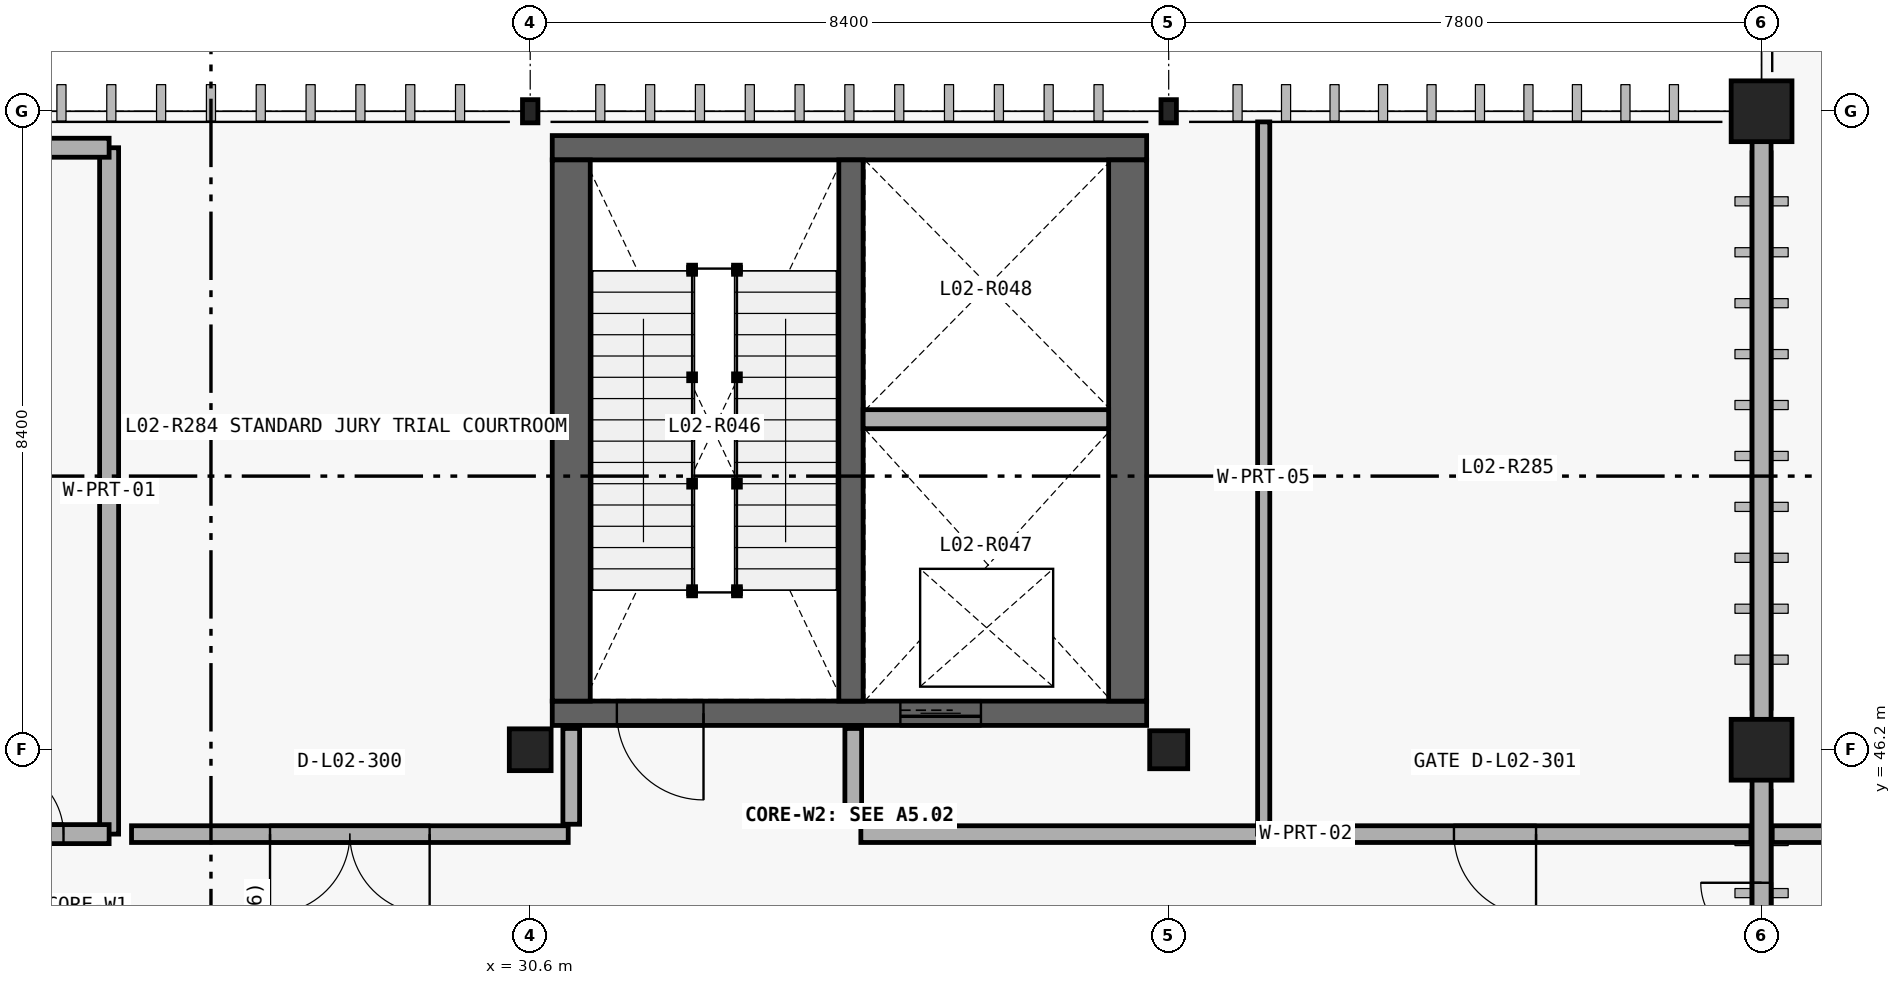
"""IFC4 building model, lengths in metres.
Left out: names, types, materials, properties, quantities, classifications, styles, units other than length and angle.
Written with IfcOpenShell. Run it as: python <this file> out.ifc"""

import sys

from ifc_helpers import new_model, si_unit, direction, frame, frame_2d, origin_with_axes, origin_2d_with_axis, place, context, subcontext, project, spatial, rectangle, hollow_rectangle, circle, i_section, extrude, element, fill, save


model = new_model("IFC4")
c1 = context("Model", 3, precision=1e-05, world=origin_with_axes(), true_north=direction((0.0, 1.0)))
c2 = subcontext(c1, "Body", "Model", "MODEL_VIEW")
j1 = project(units=[si_unit("LENGTHUNIT", "METRE"), si_unit("PLANEANGLEUNIT", "RADIAN")], contexts=[c1])
p1 = place(None, origin_with_axes())
s1 = spatial("IfcSite", under=j1, at=p1, CompositionType="ELEMENT")
p2 = place(p1, origin_with_axes())
s2 = spatial("IfcBuilding", under=s1, at=p2, CompositionType="ELEMENT")
p3 = place(p2, frame((0.0, 0.0, 10.8), z_axis=(0.0, 0.0, 1.0), x_axis=(1.0, 0.0, 0.0)))
s3 = spatial("IfcBuildingStorey", under=s2, at=p3, CompositionType="ELEMENT", Elevation=10.8)
p4 = place(None, frame((25.06, 45.09, 10.8), z_axis=(0.0, 0.0, 1.0), x_axis=(0.0, 1.0, 0.0)))
e1 = element("IfcWall", 1, at=p4, inside=s3, PredefinedType="PARTITIONING", context=c2, shape_type="SweptSolid", body=[
    extrude(rectangle(XDim=9.03, YDim=0.25, at=frame_2d((4.515, 0.0), x_axis=(1.0, 0.0))), origin_with_axes(), (0.0, 0.0, 1.0), 4.44),
])
p5 = place(None, frame((21.7, 54.12, 10.8), z_axis=(0.0, 0.0, 1.0), x_axis=(1.0, 0.0, 0.0)))
e2 = element("IfcWall", 2, at=p5, inside=s3, PredefinedType="PARTITIONING", context=c2, shape_type="SweptSolid", body=[
    extrude(rectangle(XDim=3.36, YDim=0.25, at=frame_2d((1.68, 0.0), x_axis=(1.0, 0.0))), origin_with_axes(), (0.0, 0.0, 1.0), 4.44),
])
p6 = place(None, frame((21.7, 45.09, 10.8), z_axis=(0.0, 0.0, 1.0), x_axis=(1.0, 0.0, 0.0)))
e3 = element("IfcWall", 3, at=p6, inside=s3, PredefinedType="PARTITIONING", context=c2, shape_type="SweptSolid", body=[
    extrude(rectangle(XDim=3.36, YDim=0.25, at=frame_2d((1.68, 0.0), x_axis=(1.0, 0.0))), origin_with_axes(), (0.0, 0.0, 1.0), 4.44),
])
p7 = place(None, frame((24.005, 45.09, 10.8), z_axis=(0.0, 0.0, 1.0), x_axis=(1.0, 0.0, 0.0)))
e4 = element("IfcOpeningElement", 4, at=p7, cuts=e3, PredefinedType="OPENING", context=c2, shape_type="SweptSolid", body=[
    extrude(rectangle(XDim=0.91, YDim=2.12, at=frame_2d((0.0, 1.06), x_axis=(1.0, 0.0))), frame((0.0, 0.135, 0.0), z_axis=(0.0, -1.0, 0.0), x_axis=(1.0, 0.0, 0.0)), (0.0, 0.0, 1.0), 0.27),
])
p8 = place(None, frame((30.89, 46.68, 10.8), z_axis=(0.0, 0.0, 1.0), x_axis=(1.0, 0.0, 0.0)))
e5 = element("IfcWall", 5, at=p8, inside=s3, PredefinedType="SHEAR", context=c2, shape_type="SweptSolid", body=[
    extrude(rectangle(XDim=7.82, YDim=0.32, at=frame_2d((3.91, 0.0), x_axis=(1.0, 0.0))), origin_with_axes(), (0.0, 0.0, 1.0), 4.8),
])
p9 = place(None, frame((32.31, 46.68, 10.8), z_axis=(0.0, 0.0, 1.0), x_axis=(1.0, 0.0, 0.0)))
e6 = element("IfcOpeningElement", 6, at=p9, cuts=e5, PredefinedType="OPENING", context=c2, shape_type="SweptSolid", body=[
    extrude(rectangle(XDim=1.14, YDim=2.18, at=frame_2d((0.0, 1.09), x_axis=(1.0, 0.0))), frame((0.0, 0.17, 0.0), z_axis=(0.0, -1.0, 0.0), x_axis=(1.0, 0.0, 0.0)), (0.0, 0.0, 1.0), 0.34),
])
p10 = place(None, frame((36.0, 46.68, 10.8), z_axis=(0.0, 0.0, 1.0), x_axis=(1.0, 0.0, 0.0)))
e7 = element("IfcOpeningElement", 7, at=p10, cuts=e5, PredefinedType="OPENING", context=c2, shape_type="SweptSolid", body=[
    extrude(rectangle(XDim=1.06, YDim=2.16, at=frame_2d((0.0, 1.08), x_axis=(1.0, 0.0))), frame((0.0, 0.17, 0.0), z_axis=(0.0, -1.0, 0.0), x_axis=(1.0, 0.0, 0.0)), (0.0, 0.0, 1.0), 0.34),
])
p11 = place(None, frame((38.71, 54.12, 10.8), z_axis=(0.0, 0.0, 1.0), x_axis=(-1.0, 0.0, 0.0)))
e8 = element("IfcWall", 8, at=p11, inside=s3, PredefinedType="SHEAR", context=c2, shape_type="SweptSolid", body=[
    extrude(rectangle(XDim=7.82, YDim=0.32, at=frame_2d((3.91, 0.0), x_axis=(1.0, 0.0))), origin_with_axes(), (0.0, 0.0, 1.0), 4.8),
])
for number, where, z_axis, x_axis in (
    (9, (38.46, 46.84, 10.8), (0.0, 0.0, 1.0), (0.0, 1.0, 0.0)),
    (10, (31.14, 53.96, 10.8), (0.0, 0.0, 1.0), (0.0, -1.0, 0.0)),
):
    element("IfcWall", number, at=place(None, frame(where, z_axis=z_axis, x_axis=x_axis)), inside=s3, PredefinedType="SHEAR", context=c2, shape_type="SweptSolid", body=[
        extrude(rectangle(XDim=7.12, YDim=0.5, at=frame_2d((3.56, 0.0), x_axis=(1.0, 0.0))), origin_with_axes(), (0.0, 0.0, 1.0), 4.8),
    ])
p12 = place(None, frame((34.82, 46.84, 10.8), z_axis=(0.0, 0.0, 1.0), x_axis=(0.0, 1.0, 0.0)))
e11 = element("IfcWall", 11, at=p12, inside=s3, PredefinedType="SHEAR", context=c2, shape_type="SweptSolid", body=[
    extrude(rectangle(XDim=7.12, YDim=0.32, at=frame_2d((3.56, 0.0), x_axis=(1.0, 0.0))), origin_with_axes(), (0.0, 0.0, 1.0), 4.8),
])
p13 = place(None, frame((34.98, 50.549, 10.8), z_axis=(0.0, 0.0, 1.0), x_axis=(1.0, 0.0, 0.0)))
e12 = element("IfcWall", 12, at=p13, inside=s3, PredefinedType="PARTITIONING", context=c2, shape_type="SweptSolid", body=[
    extrude(rectangle(XDim=3.23, YDim=0.25, at=frame_2d((1.615, 0.0), x_axis=(1.0, 0.0))), origin_with_axes(), (0.0, 0.0, 1.0), 4.44),
])
p14 = place(None, frame((46.8, 39.05, 10.8), z_axis=(0.0, 0.0, 1.0), x_axis=(0.0, 1.0, 0.0)))
e13 = element("IfcWall", 13, at=p14, inside=s3, PredefinedType="PARTITIONING", context=c2, shape_type="SweptSolid", body=[
    extrude(rectangle(XDim=15.5, YDim=0.25, at=frame_2d((7.75, 0.0), x_axis=(1.0, 0.0))), origin_with_axes(), (0.0, 0.0, 1.0), 4.104),
])
p15 = place(None, frame((46.8, 43.65, 10.8), z_axis=(0.0, 0.0, 1.0), x_axis=(0.0, 1.0, 0.0)))
e14 = element("IfcOpeningElement", 14, at=p15, cuts=e13, PredefinedType="OPENING", context=c2, shape_type="SweptSolid", body=[
    extrude(rectangle(XDim=1.6, YDim=2.32, at=frame_2d((0.0, 1.16), x_axis=(1.0, 0.0))), frame((0.0, 0.135, 0.0), z_axis=(0.0, -1.0, 0.0), x_axis=(1.0, 0.0, 0.0)), (0.0, 0.0, 1.0), 0.27),
])
for number, where, z_axis, x_axis in (
    (15, (31.14, 45.22, 10.8), (0.0, 0.0, 1.0), (0.0, 1.0, 0.0)),
    (16, (34.85, 45.22, 10.8), (0.0, 0.0, 1.0), (0.0, 1.0, 0.0)),
):
    element("IfcWall", number, at=place(None, frame(where, z_axis=z_axis, x_axis=x_axis)), inside=s3, PredefinedType="PARTITIONING", context=c2, shape_type="SweptSolid", body=[
        extrude(rectangle(XDim=1.26, YDim=0.22, at=frame_2d((0.63, 0.0), x_axis=(1.0, 0.0))), origin_with_axes(), (0.0, 0.0, 1.0), 4.44),
    ])
p16 = place(None, frame((25.355, 45.09, 10.8), z_axis=(0.0, 0.0, 1.0), x_axis=(1.0, 0.0, 0.0)))
e17 = element("IfcWall", 17, at=p16, inside=s3, PredefinedType="PARTITIONING", context=c2, shape_type="SweptSolid", body=[
    extrude(rectangle(XDim=5.745, YDim=0.22, at=frame_2d((2.873, 0.0), x_axis=(1.0, 0.0))), origin_with_axes(), (0.0, 0.0, 1.0), 4.44),
])
p17 = place(None, frame((28.227, 45.09, 10.8), z_axis=(0.0, 0.0, 1.0), x_axis=(1.0, 0.0, 0.0)))
e18 = element("IfcOpeningElement", 18, at=p17, cuts=e17, PredefinedType="OPENING", context=c2, shape_type="SweptSolid", body=[
    extrude(rectangle(XDim=2.1, YDim=2.8, at=frame_2d((0.0, 1.4), x_axis=(1.0, 0.0))), frame((0.0, 0.12, 0.0), z_axis=(0.0, -1.0, 0.0), x_axis=(1.0, 0.0, 0.0)), (0.0, 0.0, 1.0), 0.24),
])
p18 = place(None, frame((34.95, 45.09, 10.8), z_axis=(0.0, 0.0, 1.0), x_axis=(1.0, 0.0, 0.0)))
e19 = element("IfcWall", 19, at=p18, inside=s3, PredefinedType="PARTITIONING", context=c2, shape_type="SweptSolid", body=[
    extrude(rectangle(XDim=11.71, YDim=0.22, at=frame_2d((5.855, 0.0), x_axis=(1.0, 0.0))), origin_with_axes(), (0.0, 0.0, 1.0), 4.44),
])
p19 = place(None, frame((43.293, 45.09, 10.8), z_axis=(0.0, 0.0, 1.0), x_axis=(1.0, 0.0, 0.0)))
e20 = element("IfcOpeningElement", 20, at=p19, cuts=e19, PredefinedType="OPENING", context=c2, shape_type="SweptSolid", body=[
    extrude(rectangle(XDim=1.08, YDim=2.18, at=frame_2d((0.0, 1.09), x_axis=(1.0, 0.0))), frame((0.0, 0.12, 0.0), z_axis=(0.0, -1.0, 0.0), x_axis=(1.0, 0.0, 0.0)), (0.0, 0.0, 1.0), 0.24),
])
p20 = place(None, frame((40.25, 45.09, 10.8), z_axis=(0.0, 0.0, 1.0), x_axis=(0.0, 1.0, 0.0)))
e21 = element("IfcWall", 21, at=p20, inside=s3, PredefinedType="PARTITIONING", context=c2, shape_type="SweptSolid", body=[
    extrude(rectangle(XDim=9.37, YDim=0.16, at=frame_2d((4.685, 0.0), x_axis=(1.0, 0.0))), origin_with_axes(), (0.0, 0.0, 1.0), 4.44),
])
p21 = place(None, frame((46.94, 45.09, 10.8), z_axis=(0.0, 0.0, 1.0), x_axis=(1.0, 0.0, 0.0)))
e22 = element("IfcWall", 22, at=p21, inside=s3, PredefinedType="PARTITIONING", context=c2, shape_type="SweptSolid", body=[
    extrude(rectangle(XDim=8.76, YDim=0.22, at=frame_2d((4.38, 0.0), x_axis=(1.0, 0.0))), origin_with_axes(), (0.0, 0.0, 1.0), 4.44),
])
p22 = place(None, frame((51.32, 45.09, 10.8), z_axis=(0.0, 0.0, 1.0), x_axis=(1.0, 0.0, 0.0)))
e23 = element("IfcOpeningElement", 23, at=p22, cuts=e22, PredefinedType="OPENING", context=c2, shape_type="SweptSolid", body=[
    extrude(rectangle(XDim=0.94, YDim=2.3, at=frame_2d((0.0, 1.15), x_axis=(1.0, 0.0))), frame((0.0, 0.12, 0.0), z_axis=(0.0, -1.0, 0.0), x_axis=(1.0, 0.0, 0.0)), (0.0, 0.0, 1.0), 0.24),
])
p23 = place(None, frame((30.6, 46.2, 10.8), z_axis=(0.0, 0.0, 1.0), x_axis=(1.0, 0.0, 0.0)))
e24 = element("IfcColumn", 24, at=p23, inside=s3, PredefinedType="COLUMN", context=c2, shape_type="SweptSolid", body=[
    extrude(i_section(OverallWidth=0.55, OverallDepth=0.55, WebThickness=0.025, FlangeThickness=0.042, at=origin_2d_with_axis()), origin_with_axes(), (0.0, 0.0, 1.0), 4.8),
])
p24 = place(None, frame((30.6, 54.6, 10.8), z_axis=(0.0, 0.0, 1.0), x_axis=(1.0, 0.0, 0.0)))
e25 = element("IfcColumn", 25, at=p24, inside=s3, PredefinedType="COLUMN", context=c2, shape_type="SweptSolid", body=[
    extrude(hollow_rectangle(XDim=0.203, YDim=0.305, WallThickness=0.013, InnerFilletRadius=0.025, OuterFilletRadius=0.013, at=origin_2d_with_axis()), origin_with_axes(), (0.0, 0.0, 1.0), 4.8),
])
p25 = place(None, frame((39.0, 46.2, 10.8), z_axis=(0.0, 0.0, 1.0), x_axis=(1.0, 0.0, 0.0)))
e26 = element("IfcColumn", 26, at=p25, inside=s3, PredefinedType="COLUMN", context=c2, shape_type="SweptSolid", body=[
    extrude(i_section(OverallWidth=0.5, OverallDepth=0.5, WebThickness=0.022, FlangeThickness=0.036, at=origin_2d_with_axis()), origin_with_axes(), (0.0, 0.0, 1.0), 4.8),
])
p26 = place(None, frame((39.0, 54.6, 10.8), z_axis=(0.0, 0.0, 1.0), x_axis=(1.0, 0.0, 0.0)))
e27 = element("IfcColumn", 27, at=p26, inside=s3, PredefinedType="COLUMN", context=c2, shape_type="SweptSolid", body=[
    extrude(hollow_rectangle(XDim=0.203, YDim=0.305, WallThickness=0.013, InnerFilletRadius=0.025, OuterFilletRadius=0.013, at=origin_2d_with_axis()), origin_with_axes(), (0.0, 0.0, 1.0), 4.8),
])
for number, where, z_axis, x_axis in (
    (28, (46.8, 46.2, 10.8), (0.0, 0.0, 1.0), (1.0, 0.0, 0.0)),
    (29, (46.8, 54.6, 10.8), (0.0, 0.0, 1.0), (1.0, 0.0, 0.0)),
):
    element("IfcColumn", number, at=place(None, frame(where, z_axis=z_axis, x_axis=x_axis)), inside=s3, PredefinedType="COLUMN", context=c2, shape_type="SweptSolid", body=[
        extrude(circle(Radius=0.4, at=origin_2d_with_axis()), origin_with_axes(), (0.0, 0.0, 1.0), 4.8),
    ])
p27 = place(None, frame((24.005, 45.09, 10.8), z_axis=(0.0, 0.0, 1.0), x_axis=(1.0, 0.0, 0.0)))
e30 = element("IfcDoor", 30, at=p27, inside=s3, OperationType="SINGLE_SWING_LEFT", PredefinedType="DOOR", context=c2, shape_type="SweptSolid", body=[
    extrude(rectangle(XDim=0.91, YDim=2.12, at=frame_2d((0.0, 1.06), x_axis=(1.0, 0.0))), frame((0.0, 0.04, 0.0), z_axis=(0.0, -1.0, 0.0), x_axis=(1.0, 0.0, 0.0)), (0.0, 0.0, 1.0), 0.08),
])
fill(e4, e30)
p28 = place(None, frame((32.31, 46.68, 10.8), z_axis=(0.0, 0.0, 1.0), x_axis=(-1.0, 0.0, 0.0)))
e31 = element("IfcDoor", 31, at=p28, inside=s3, OperationType="SINGLE_SWING_RIGHT", PredefinedType="DOOR", context=c2, shape_type="SweptSolid", body=[
    extrude(rectangle(XDim=1.14, YDim=2.18, at=frame_2d((0.0, 1.09), x_axis=(1.0, 0.0))), frame((0.0, 0.04, 0.0), z_axis=(0.0, -1.0, 0.0), x_axis=(1.0, 0.0, 0.0)), (0.0, 0.0, 1.0), 0.08),
])
fill(e6, e31)
p29 = place(None, frame((36.0, 46.68, 10.8), z_axis=(0.0, 0.0, 1.0), x_axis=(-1.0, 0.0, 0.0)))
e32 = element("IfcDoor", 32, at=p29, inside=s3, OperationType="SLIDING_TO_LEFT", PredefinedType="DOOR", context=c2, shape_type="SweptSolid", body=[
    extrude(rectangle(XDim=1.06, YDim=2.16, at=frame_2d((0.0, 1.08), x_axis=(1.0, 0.0))), frame((0.0, 0.04, 0.0), z_axis=(0.0, -1.0, 0.0), x_axis=(1.0, 0.0, 0.0)), (0.0, 0.0, 1.0), 0.08),
])
fill(e7, e32)
p30 = place(None, frame((46.8, 43.65, 10.8), z_axis=(0.0, 0.0, 1.0), x_axis=(0.0, 1.0, 0.0)))
e33 = element("IfcDoor", 33, at=p30, inside=s3, OperationType="DOUBLE_DOOR_SINGLE_SWING", PredefinedType="DOOR", context=c2, shape_type="SweptSolid", body=[
    extrude(rectangle(XDim=1.6, YDim=2.32, at=frame_2d((0.0, 1.16), x_axis=(1.0, 0.0))), frame((0.0, 0.04, 0.0), z_axis=(0.0, -1.0, 0.0), x_axis=(1.0, 0.0, 0.0)), (0.0, 0.0, 1.0), 0.08),
])
fill(e14, e33)
p31 = place(None, frame((28.227, 45.09, 10.8), z_axis=(0.0, 0.0, 1.0), x_axis=(-1.0, 0.0, 0.0)))
e34 = element("IfcDoor", 34, at=p31, inside=s3, OperationType="DOUBLE_DOOR_SINGLE_SWING", PredefinedType="DOOR", context=c2, shape_type="SweptSolid", body=[
    extrude(rectangle(XDim=2.1, YDim=2.8, at=frame_2d((0.0, 1.4), x_axis=(1.0, 0.0))), frame((0.0, 0.04, 0.0), z_axis=(0.0, -1.0, 0.0), x_axis=(1.0, 0.0, 0.0)), (0.0, 0.0, 1.0), 0.08),
])
fill(e18, e34)
p32 = place(None, frame((43.293, 45.09, 10.8), z_axis=(0.0, 0.0, 1.0), x_axis=(-1.0, 0.0, 0.0)))
e35 = element("IfcDoor", 35, at=p32, inside=s3, OperationType="SINGLE_SWING_RIGHT", PredefinedType="GATE", context=c2, shape_type="SweptSolid", body=[
    extrude(rectangle(XDim=1.08, YDim=2.18, at=frame_2d((0.0, 1.09), x_axis=(1.0, 0.0))), frame((0.0, 0.04, 0.0), z_axis=(0.0, -1.0, 0.0), x_axis=(1.0, 0.0, 0.0)), (0.0, 0.0, 1.0), 0.08),
])
fill(e20, e35)
save(model, sys.argv[1])
